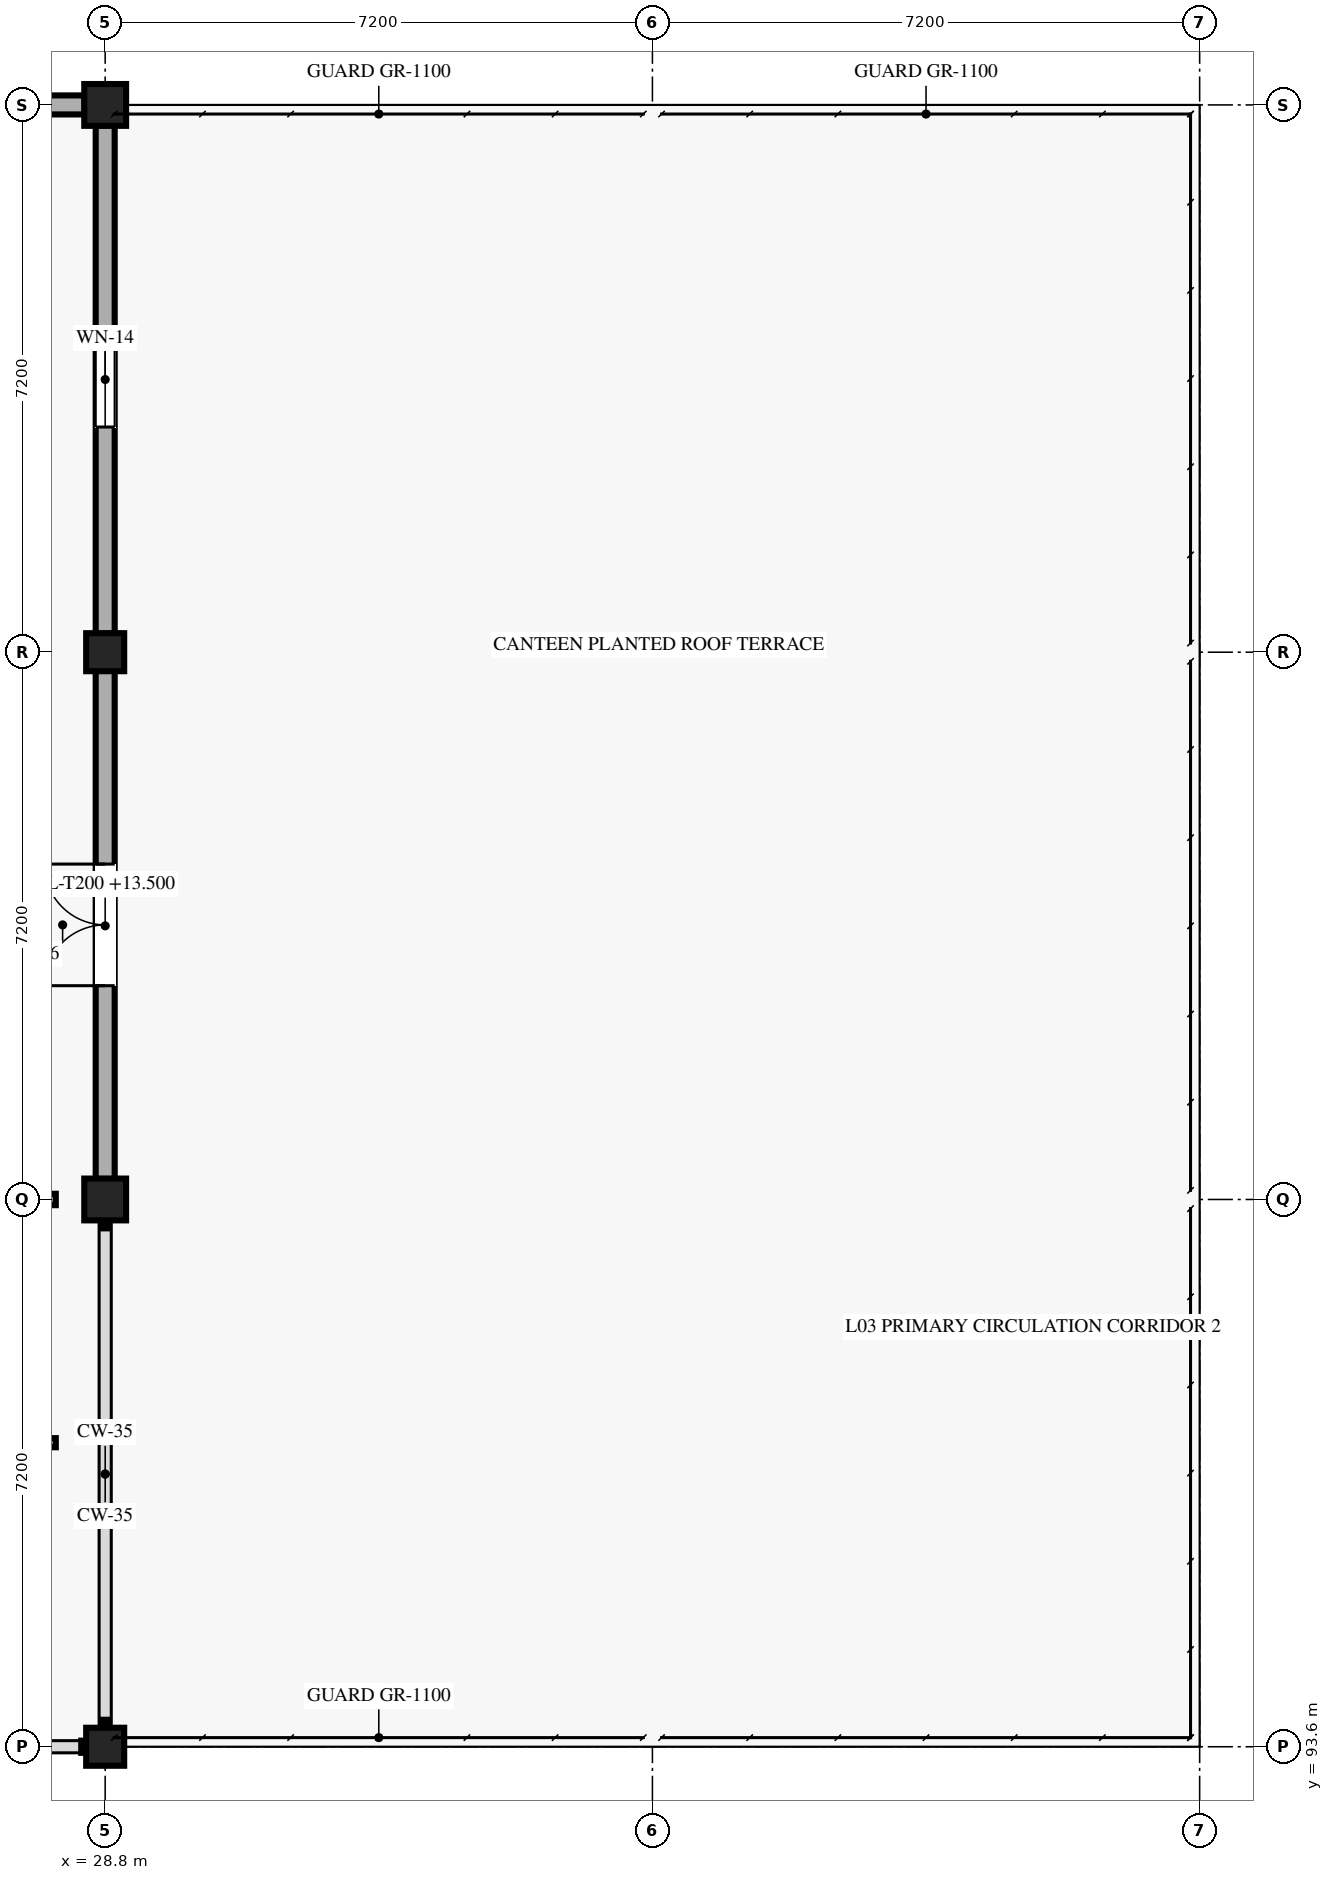
"""IFC4 building model, lengths in metres.
Left out: names, types, materials, properties, quantities, classifications, styles, units other than length and angle.
Written with IfcOpenShell. Run it as: python <this file> out.ifc"""

import sys

from ifc_helpers import new_model, si_unit, direction, frame, frame_2d, origin, origin_2d, place, context, subcontext, project, spatial, rectangle, extrude, element, fill, save


model = new_model("IFC4")
c1 = context("Model", 3, precision=1e-05, world=origin(), true_north=direction((0.0, 1.0)))
c2 = subcontext(c1, "Body", "Model", "MODEL_VIEW")
j1 = project(units=[si_unit("LENGTHUNIT", "METRE"), si_unit("PLANEANGLEUNIT", "RADIAN")], contexts=[c1])
p1 = place(None, origin())
s1 = spatial("IfcSite", under=j1, at=p1, CompositionType="ELEMENT")
p2 = place(p1, origin())
s2 = spatial("IfcBuilding", under=s1, at=p2, CompositionType="ELEMENT")
p3 = place(p2, frame((0.0, 0.0, 13.5)))
s3 = spatial("IfcBuildingStorey", under=s2, at=p3, CompositionType="ELEMENT", Elevation=13.5)
p4 = place(p3, frame((28.8, 93.6, 0.0), z_axis=(0.0, 0.0, 1.0), x_axis=(1.0, 0.0, 0.0)))
e1 = element("IfcColumn", 1, at=p4, inside=s3, PredefinedType="COLUMN", context=c2, shape_type="SweptSolid", body=[
    extrude(rectangle(XDim=0.5, YDim=0.5, at=origin_2d()), origin(), (0.0, 0.0, 1.0), 4.05),
])
p5 = place(p3, frame((28.8, 100.8, 0.0), z_axis=(0.0, 0.0, 1.0), x_axis=(1.0, 0.0, 0.0)))
e2 = element("IfcColumn", 2, at=p5, inside=s3, PredefinedType="COLUMN", context=c2, shape_type="SweptSolid", body=[
    extrude(rectangle(XDim=0.55, YDim=0.55, at=origin_2d()), origin(), (0.0, 0.0, 1.0), 4.05),
])
p6 = place(p3, frame((28.8, 108.0, 0.0), z_axis=(0.0, 0.0, 1.0), x_axis=(1.0, 0.0, 0.0)))
e3 = element("IfcColumn", 3, at=p6, inside=s3, PredefinedType="COLUMN", context=c2, shape_type="SweptSolid", body=[
    extrude(rectangle(XDim=0.5, YDim=0.5, at=origin_2d()), origin(), (0.0, 0.0, 1.0), 4.05),
])
p7 = place(p3, frame((28.8, 115.2, 0.0), z_axis=(0.0, 0.0, 1.0), x_axis=(1.0, 0.0, 0.0)))
e4 = element("IfcColumn", 4, at=p7, inside=s3, PredefinedType="COLUMN", context=c2, shape_type="SweptSolid", body=[
    extrude(rectangle(XDim=0.55, YDim=0.55, at=origin_2d()), origin(), (0.0, 0.0, 1.0), 4.05),
])
p8 = place(p3, frame((21.845, 115.2, 0.0), z_axis=(0.0, 0.0, 1.0), x_axis=(1.0, 0.0, 0.0)))
e5 = element("IfcWall", 5, at=p8, inside=s3, PredefinedType="SOLIDWALL", context=c2, shape_type="SweptSolid", body=[
    extrude(rectangle(XDim=6.685, YDim=0.25, at=frame_2d((3.343, 0.0))), origin(), (0.0, 0.0, 1.0), 3.195),
])
p9 = place(p8, frame((2.643, 0.0, 0.85)))
e6 = element("IfcOpeningElement", 6, at=p9, cuts=e5, PredefinedType="OPENING", context=c2, shape_type="SweptSolid", body=[
    extrude(rectangle(XDim=1.4, YDim=1.6, at=frame_2d((0.7, 0.8))), frame((0.0, 0.135, 0.0), z_axis=(0.0, -1.0, 0.0), x_axis=(1.0, 0.0, 0.0)), (0.0, 0.0, 1.0), 0.27),
])
p10 = place(p3, frame((28.8, 101.07, 0.0), z_axis=(0.0, 0.0, 1.0), x_axis=(0.0, 1.0, 0.0)))
e7 = element("IfcWall", 7, at=p10, inside=s3, PredefinedType="SOLIDWALL", context=c2, shape_type="SweptSolid", body=[
    extrude(rectangle(XDim=6.685, YDim=0.25, at=frame_2d((3.342, 0.0))), origin(), (0.0, 0.0, 1.0), 3.195),
])
p11 = place(p10, frame((2.542, 0.0, 0.0)))
e8 = element("IfcOpeningElement", 8, at=p11, cuts=e7, PredefinedType="OPENING", context=c2, shape_type="SweptSolid", body=[
    extrude(rectangle(XDim=1.6, YDim=2.2, at=frame_2d((0.8, 1.1))), frame((0.0, 0.135, 0.0), z_axis=(0.0, -1.0, 0.0), x_axis=(1.0, 0.0, 0.0)), (0.0, 0.0, 1.0), 0.27),
])
p12 = place(p3, frame((28.8, 108.245, 0.0), z_axis=(0.0, 0.0, 1.0), x_axis=(0.0, 1.0, 0.0)))
e9 = element("IfcWall", 9, at=p12, inside=s3, PredefinedType="SOLIDWALL", context=c2, shape_type="SweptSolid", body=[
    extrude(rectangle(XDim=6.685, YDim=0.25, at=frame_2d((3.342, 0.0))), origin(), (0.0, 0.0, 1.0), 3.195),
])
p13 = place(p12, frame((2.718, 0.0, 0.85)))
e10 = element("IfcOpeningElement", 10, at=p13, cuts=e9, PredefinedType="OPENING", context=c2, shape_type="SweptSolid", body=[
    extrude(rectangle(XDim=1.25, YDim=1.5, at=frame_2d((0.625, 0.75))), frame((0.0, 0.135, 0.0), z_axis=(0.0, -1.0, 0.0), x_axis=(1.0, 0.0, 0.0)), (0.0, 0.0, 1.0), 0.27),
])
p14 = place(p2, frame((0.0, 0.0, 9.45)))
s4 = spatial("IfcBuildingStorey", under=s2, at=p14, CompositionType="ELEMENT", Elevation=9.45)
p15 = place(p14, frame((43.52, 115.2, -0.24), z_axis=(0.0, 0.0, 1.0), x_axis=(1.0, 0.0, 0.0)))
e11 = element("IfcWall", 11, at=p15, inside=s4, PredefinedType="SOLIDWALL", context=c2, shape_type="SweptSolid", body=[
    extrude(rectangle(XDim=6.56, YDim=0.23, at=frame_2d((3.28, 0.0))), origin(), (0.0, 0.0, 1.0), 8.79),
])
p16 = place(p15, frame((1.18, 0.0, 0.85)))
e12 = element("IfcOpeningElement", 12, at=p16, cuts=e11, PredefinedType="OPENING", context=c2, shape_type="SweptSolid", body=[
    extrude(rectangle(XDim=4.2, YDim=1.75, at=frame_2d((2.1, 0.875))), frame((0.0, 0.125, 0.0), z_axis=(0.0, -1.0, 0.0), x_axis=(1.0, 0.0, 0.0)), (0.0, 0.0, 1.0), 0.25),
])
p17 = place(p3, frame((21.85, 100.8, 0.0), z_axis=(0.0, 0.0, 1.0), x_axis=(1.0, 0.0, 0.0)))
e13 = element("IfcWall", 13, at=p17, inside=s3, PredefinedType="PARTITIONING", context=c2, shape_type="SweptSolid", body=[
    extrude(rectangle(XDim=6.3, YDim=0.15, at=frame_2d((3.15, 0.0))), origin(), (0.0, 0.0, 1.0), 3.2),
])
p18 = place(p17, frame((2.364, 0.0, 0.0)))
e14 = element("IfcOpeningElement", 14, at=p18, cuts=e13, PredefinedType="OPENING", context=c2, shape_type="SweptSolid", body=[
    extrude(rectangle(XDim=2.1, YDim=2.4, at=frame_2d((1.05, 1.2))), frame((0.0, 0.085, 0.0), z_axis=(0.0, -1.0, 0.0), x_axis=(1.0, 0.0, 0.0)), (0.0, 0.0, 1.0), 0.17),
])
p19 = place(p3, frame((0.65, 97.6, 0.0), z_axis=(0.0, 0.0, 1.0), x_axis=(1.0, 0.0, 0.0)))
e15 = element("IfcWall", 15, at=p19, inside=s3, PredefinedType="PARTITIONING", context=c2, shape_type="SweptSolid", body=[
    extrude(rectangle(XDim=27.5, YDim=0.12, at=frame_2d((13.75, 0.0))), origin(), (0.0, 0.0, 1.0), 3.81),
])
p20 = place(p19, frame((2.5, 0.0, 0.0)))
e16 = element("IfcOpeningElement", 16, at=p20, cuts=e15, PredefinedType="OPENING", context=c2, shape_type="SweptSolid", body=[
    extrude(rectangle(XDim=1.0, YDim=2.1, at=frame_2d((0.5, 1.05))), frame((0.0, 0.07, 0.0), z_axis=(0.0, -1.0, 0.0), x_axis=(1.0, 0.0, 0.0)), (0.0, 0.0, 1.0), 0.14),
])
p21 = place(p11, origin())
e17 = element("IfcDoor", 17, at=p21, inside=s3, OperationType="DOUBLE_DOOR_SINGLE_SWING", PredefinedType="DOOR", context=c2, shape_type="SweptSolid", body=[
    extrude(rectangle(XDim=1.6, YDim=2.2, at=frame_2d((0.8, 1.1))), frame((0.0, 0.025, 0.0), z_axis=(0.0, -1.0, 0.0), x_axis=(1.0, 0.0, 0.0)), (0.0, 0.0, 1.0), 0.05),
])
fill(e8, e17)
p22 = place(p13, origin())
e18 = element("IfcWindow", 18, at=p22, inside=s3, PartitioningType="SINGLE_PANEL", PredefinedType="WINDOW", context=c2, shape_type="SweptSolid", body=[
    extrude(rectangle(XDim=1.25, YDim=1.5, at=frame_2d((0.625, 0.75))), frame((0.0, 0.03, 0.0), z_axis=(0.0, -1.0, 0.0), x_axis=(1.0, 0.0, 0.0)), (0.0, 0.0, 1.0), 0.06),
])
fill(e10, e18)
save(model, sys.argv[1])
